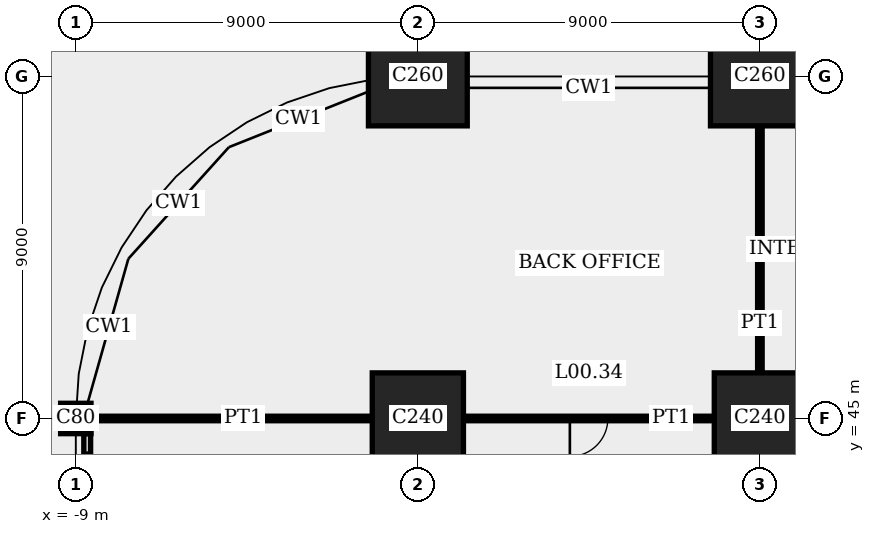
"""IFC4 building model, lengths in metres.
Left out: names, types, materials, properties, quantities, classifications, styles, units other than length and angle.
Written with IfcOpenShell. Run it as: python <this file> out.ifc"""

import sys

from ifc_helpers import new_model, si_unit, direction, frame, frame_2d, origin, origin_2d, place, context, subcontext, project, spatial, rectangle, extrude, element, fill, save


model = new_model("IFC4")
c1 = context("Model", 3, precision=1e-05, world=origin(), true_north=direction((0.0, 1.0)))
c2 = subcontext(c1, "Body", "Model", "MODEL_VIEW")
j1 = project(units=[si_unit("LENGTHUNIT", "METRE"), si_unit("PLANEANGLEUNIT", "RADIAN")], contexts=[c1])
p1 = place(None, origin())
s1 = spatial("IfcSite", under=j1, at=p1, CompositionType="ELEMENT")
p2 = place(p1, origin())
s2 = spatial("IfcBuilding", under=s1, at=p2, CompositionType="ELEMENT")
p3 = place(p2, origin())
s3 = spatial("IfcBuildingStorey", under=s2, at=p3, CompositionType="ELEMENT", Elevation=0.0)
p4 = place(p3, frame((-9.0, 45.0, 0.0), z_axis=(0.0, 0.0, 1.0), x_axis=(1.0, 0.0, 0.0)))
e1 = element("IfcColumn", 1, at=p4, inside=s3, PredefinedType="COLUMN", context=c2, shape_type="SweptSolid", body=[
    extrude(rectangle(XDim=0.8, YDim=0.8, at=origin_2d()), origin(), (0.0, 0.0, 1.0), 5.4),
])
p5 = place(p3, frame((0.0, 45.0, 0.0), z_axis=(0.0, 0.0, 1.0), x_axis=(1.0, 0.0, 0.0)))
e2 = element("IfcColumn", 2, at=p5, inside=s3, PredefinedType="COLUMN", context=c2, shape_type="SweptSolid", body=[
    extrude(rectangle(XDim=2.4, YDim=2.4, at=origin_2d()), origin(), (0.0, 0.0, 1.0), 5.4),
])
p6 = place(p3, frame((0.0, 54.0, 0.0), z_axis=(0.0, 0.0, 1.0), x_axis=(1.0, 0.0, 0.0)))
e3 = element("IfcColumn", 3, at=p6, inside=s3, PredefinedType="COLUMN", context=c2, shape_type="SweptSolid", body=[
    extrude(rectangle(XDim=2.6, YDim=2.6, at=origin_2d()), origin(), (0.0, 0.0, 1.0), 5.4),
])
p7 = place(p3, frame((9.0, 45.0, 0.0), z_axis=(0.0, 0.0, 1.0), x_axis=(1.0, 0.0, 0.0)))
e4 = element("IfcColumn", 4, at=p7, inside=s3, PredefinedType="COLUMN", context=c2, shape_type="SweptSolid", body=[
    extrude(rectangle(XDim=2.4, YDim=2.4, at=origin_2d()), origin(), (0.0, 0.0, 1.0), 5.4),
])
p8 = place(p3, frame((9.0, 54.0, 0.0), z_axis=(0.0, 0.0, 1.0), x_axis=(1.0, 0.0, 0.0)))
e5 = element("IfcColumn", 5, at=p8, inside=s3, PredefinedType="COLUMN", context=c2, shape_type="SweptSolid", body=[
    extrude(rectangle(XDim=2.6, YDim=2.6, at=origin_2d()), origin(), (0.0, 0.0, 1.0), 5.4),
])
p9 = place(p3, frame((-8.7, 36.4, 0.0), z_axis=(0.0, 0.0, 1.0), x_axis=(0.0, 1.0, 0.0)))
e6 = element("IfcWall", 6, at=p9, inside=s3, PredefinedType="SOLIDWALL", context=c2, shape_type="SweptSolid", body=[
    extrude(rectangle(XDim=8.2, YDim=0.18, at=frame_2d((4.1, 0.0))), origin(), (0.0, 0.0, 1.0), 4.3),
])
p10 = place(p9, frame((3.2, 0.0, 0.0)))
e7 = element("IfcOpeningElement", 7, at=p10, cuts=e6, PredefinedType="OPENING", context=c2, shape_type="SweptSolid", body=[
    extrude(rectangle(XDim=1.8, YDim=2.4, at=frame_2d((0.9, 1.2))), frame((0.0, 0.1, 0.0), z_axis=(0.0, -1.0, 0.0), x_axis=(1.0, 0.0, 0.0)), (0.0, 0.0, 1.0), 0.2),
])
p11 = place(p9, frame((0.5, 0.0, 0.3)))
e8 = element("IfcOpeningElement", 8, at=p11, cuts=e6, PredefinedType="OPENING", context=c2, shape_type="SweptSolid", body=[
    extrude(rectangle(XDim=1.5, YDim=2.4, at=frame_2d((0.75, 1.2))), frame((0.0, 0.1, 0.0), z_axis=(0.0, -1.0, 0.0), x_axis=(1.0, 0.0, 0.0)), (0.0, 0.0, 1.0), 0.2),
])
p12 = place(p9, frame((6.2, 0.0, 0.3)))
e9 = element("IfcOpeningElement", 9, at=p12, cuts=e6, PredefinedType="OPENING", context=c2, shape_type="SweptSolid", body=[
    extrude(rectangle(XDim=1.5, YDim=2.4, at=frame_2d((0.75, 1.2))), frame((0.0, 0.1, 0.0), z_axis=(0.0, -1.0, 0.0), x_axis=(1.0, 0.0, 0.0)), (0.0, 0.0, 1.0), 0.2),
])
p13 = place(p3, frame((-8.6, 45.0, 0.0), z_axis=(0.0, 0.0, 1.0), x_axis=(1.0, 0.0, 0.0)))
e10 = element("IfcWall", 10, at=p13, inside=s3, PredefinedType="PARTITIONING", context=c2, shape_type="SweptSolid", body=[
    extrude(rectangle(XDim=7.4, YDim=0.12, at=frame_2d((3.7, 0.0))), origin(), (0.0, 0.0, 1.0), 4.3),
])
p14 = place(p3, frame((1.2, 45.0, 0.0), z_axis=(0.0, 0.0, 1.0), x_axis=(1.0, 0.0, 0.0)))
e11 = element("IfcWall", 11, at=p14, inside=s3, PredefinedType="PARTITIONING", context=c2, shape_type="SweptSolid", body=[
    extrude(rectangle(XDim=6.6, YDim=0.12, at=frame_2d((3.3, 0.0))), origin(), (0.0, 0.0, 1.0), 4.3),
])
p15 = place(p14, frame((2.8, 0.0, 0.0)))
e12 = element("IfcOpeningElement", 12, at=p15, cuts=e11, PredefinedType="OPENING", context=c2, shape_type="SweptSolid", body=[
    extrude(rectangle(XDim=1.0, YDim=2.4, at=frame_2d((0.5, 1.2))), frame((0.0, 0.07, 0.0), z_axis=(0.0, -1.0, 0.0), x_axis=(1.0, 0.0, 0.0)), (0.0, 0.0, 1.0), 0.14),
])
p16 = place(p3, frame((9.0, 46.2, 0.0), z_axis=(0.0, 0.0, 1.0), x_axis=(0.0, 1.0, 0.0)))
e13 = element("IfcWall", 13, at=p16, inside=s3, PredefinedType="PARTITIONING", context=c2, shape_type="SweptSolid", body=[
    extrude(rectangle(XDim=6.5, YDim=0.12, at=frame_2d((3.25, 0.0))), origin(), (0.0, 0.0, 1.0), 4.3),
])
p17 = place(p12, origin())
e14 = element("IfcWindow", 14, at=p17, inside=s3, PartitioningType="SINGLE_PANEL", PredefinedType="WINDOW", context=c2, shape_type="SweptSolid", body=[
    extrude(rectangle(XDim=1.5, YDim=2.4, at=frame_2d((0.75, 1.2))), frame((0.0, 0.03, 0.0), z_axis=(0.0, -1.0, 0.0), x_axis=(1.0, 0.0, 0.0)), (0.0, 0.0, 1.0), 0.06),
])
fill(e9, e14)
p18 = place(p15, origin())
e15 = element("IfcDoor", 15, at=p18, inside=s3, OperationType="SINGLE_SWING_LEFT", PredefinedType="DOOR", context=c2, shape_type="SweptSolid", body=[
    extrude(rectangle(XDim=1.0, YDim=2.4, at=frame_2d((0.5, 1.2))), frame((0.0, 0.025, 0.0), z_axis=(0.0, -1.0, 0.0), x_axis=(1.0, 0.0, 0.0)), (0.0, 0.0, 1.0), 0.05),
])
fill(e12, e15)
save(model, sys.argv[1])
